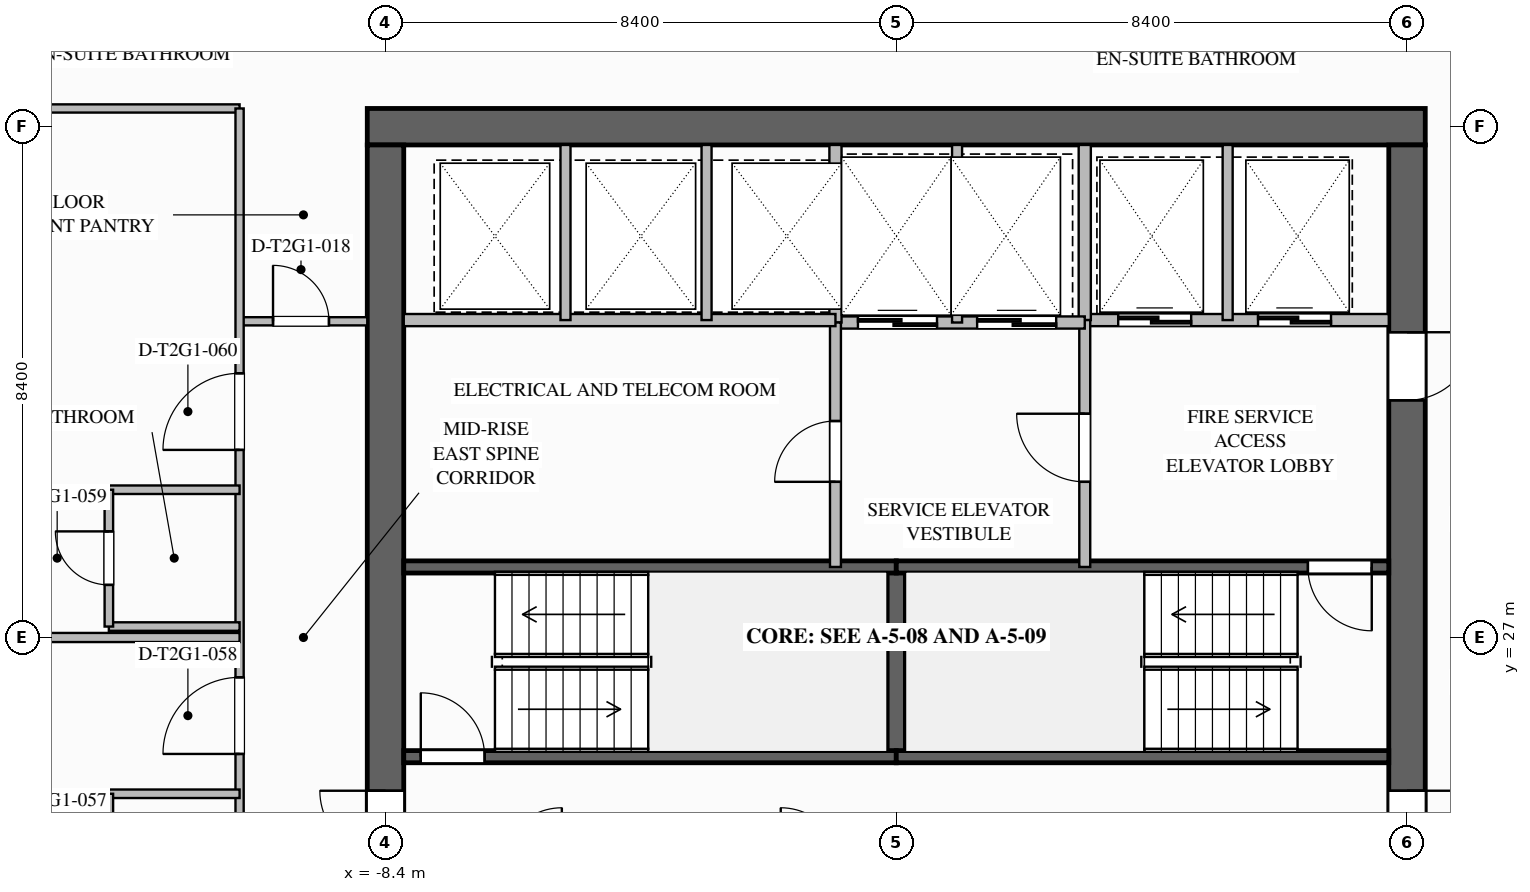
"""IFC4 building model, lengths in metres.
Left out: names, types, materials, properties, quantities, classifications, styles, units other than length and angle.
Written with IfcOpenShell. Run it as: python <this file> out.ifc"""

import sys

from ifc_helpers import new_model, si_unit, direction, frame, frame_2d, origin, place, context, subcontext, project, spatial, rectangle, extrude, element, fill, save


model = new_model("IFC4")
c1 = context("Model", 3, precision=1e-05, world=origin(), true_north=direction((0.0, 1.0)))
c2 = subcontext(c1, "Body", "Model", "MODEL_VIEW")
j1 = project(units=[si_unit("LENGTHUNIT", "METRE"), si_unit("PLANEANGLEUNIT", "RADIAN")], contexts=[c1])
p1 = place(None, origin())
s1 = spatial("IfcSite", under=j1, at=p1, CompositionType="ELEMENT")
p2 = place(p1, origin())
s2 = spatial("IfcBuilding", under=s1, at=p2, CompositionType="ELEMENT")
p3 = place(p2, frame((0.0, 0.0, 91.8)))
s3 = spatial("IfcBuildingStorey", under=s2, at=p3, CompositionType="ELEMENT", Elevation=91.8)
p4 = place(p3, frame((-8.7, 35.4, 0.0), z_axis=(0.0, 0.0, 1.0), x_axis=(1.0, 0.0, 0.0)))
e1 = element("IfcWall", 1, at=p4, inside=s3, PredefinedType="SHEAR", context=c2, shape_type="SweptSolid", body=[
    extrude(rectangle(XDim=17.4, YDim=0.6, at=frame_2d((8.7, 0.0))), origin(), (0.0, 0.0, 1.0), 3.5),
])
p5 = place(p3, frame((8.4, 35.1, 0.0), z_axis=(0.0, 0.0, 1.0), x_axis=(0.0, -1.0, 0.0)))
e2 = element("IfcWall", 2, at=p5, inside=s3, PredefinedType="SHEAR", context=c2, shape_type="SweptSolid", body=[
    extrude(rectangle(XDim=16.2, YDim=0.6, at=frame_2d((8.1, 0.0))), origin(), (0.0, 0.0, 1.0), 3.5),
])
p6 = place(p5, frame((3.08, 0.0, 0.0)))
e3 = element("IfcOpeningElement", 3, at=p6, cuts=e2, PredefinedType="OPENING", context=c2, shape_type="SweptSolid", body=[
    extrude(rectangle(XDim=1.12, YDim=2.1, at=frame_2d((0.56, 1.05))), frame((0.0, 0.31, 0.0), z_axis=(0.0, -1.0, 0.0), x_axis=(1.0, 0.0, 0.0)), (0.0, 0.0, 1.0), 0.62),
])
p7 = place(p5, frame((10.62, 0.0, 0.0)))
e4 = element("IfcOpeningElement", 4, at=p7, cuts=e2, PredefinedType="OPENING", context=c2, shape_type="SweptSolid", body=[
    extrude(rectangle(XDim=1.08, YDim=2.04, at=frame_2d((0.54, 1.02))), frame((0.0, 0.31, 0.0), z_axis=(0.0, -1.0, 0.0), x_axis=(1.0, 0.0, 0.0)), (0.0, 0.0, 1.0), 0.62),
])
p8 = place(p3, frame((-8.4, 18.9, 0.0), z_axis=(0.0, 0.0, 1.0), x_axis=(0.0, 1.0, 0.0)))
e5 = element("IfcWall", 5, at=p8, inside=s3, PredefinedType="SHEAR", context=c2, shape_type="SweptSolid", body=[
    extrude(rectangle(XDim=16.2, YDim=0.6, at=frame_2d((8.1, 0.0))), origin(), (0.0, 0.0, 1.0), 3.5),
])
p9 = place(p8, frame((4.5, 0.0, 0.0)))
e6 = element("IfcOpeningElement", 6, at=p9, cuts=e5, PredefinedType="OPENING", context=c2, shape_type="SweptSolid", body=[
    extrude(rectangle(XDim=1.08, YDim=2.04, at=frame_2d((0.54, 1.02))), frame((0.0, 0.31, 0.0), z_axis=(0.0, -1.0, 0.0), x_axis=(1.0, 0.0, 0.0)), (0.0, 0.0, 1.0), 0.62),
])
p10 = place(p3, frame((0.0, 25.04, 0.0), z_axis=(0.0, 0.0, 1.0), x_axis=(0.0, 1.0, 0.0)))
e7 = element("IfcWall", 7, at=p10, inside=s3, PredefinedType="SOLIDWALL", context=c2, shape_type="SweptSolid", body=[
    extrude(rectangle(XDim=3.12, YDim=0.3, at=frame_2d((1.56, 0.0))), origin(), (0.0, 0.0, 1.0), 3.24),
])
p11 = place(p3, frame((-8.1, 25.04, 0.0), z_axis=(0.0, 0.0, 1.0), x_axis=(1.0, 0.0, 0.0)))
e8 = element("IfcWall", 8, at=p11, inside=s3, PredefinedType="SOLIDWALL", context=c2, shape_type="SweptSolid", body=[
    extrude(rectangle(XDim=8.1, YDim=0.2, at=frame_2d((4.05, 0.0))), origin(), (0.0, 0.0, 1.0), 3.24),
])
p12 = place(p11, frame((0.28, 0.0, 0.0)))
e9 = element("IfcOpeningElement", 9, at=p12, cuts=e8, PredefinedType="OPENING", context=c2, shape_type="SweptSolid", body=[
    extrude(rectangle(XDim=1.05, YDim=2.1, at=frame_2d((0.525, 1.05))), frame((0.0, 0.11, 0.0), z_axis=(0.0, -1.0, 0.0), x_axis=(1.0, 0.0, 0.0)), (0.0, 0.0, 1.0), 0.22),
])
for number, where, z_axis, x_axis in (
    (10, (-8.1, 28.16, 0.0), (0.0, 0.0, 1.0), (1.0, 0.0, 0.0)),
    (11, (0.0, 25.04, 0.0), (0.0, 0.0, 1.0), (1.0, 0.0, 0.0)),
):
    element("IfcWall", number, at=place(p3, frame(where, z_axis=z_axis, x_axis=x_axis)), inside=s3, PredefinedType="SOLIDWALL", context=c2, shape_type="SweptSolid", body=[
        extrude(rectangle(XDim=8.1, YDim=0.2, at=frame_2d((4.05, 0.0))), origin(), (0.0, 0.0, 1.0), 3.24),
    ])
p13 = place(p3, frame((8.1, 28.16, 0.0), z_axis=(0.0, 0.0, 1.0), x_axis=(-1.0, 0.0, 0.0)))
e12 = element("IfcWall", 12, at=p13, inside=s3, PredefinedType="SOLIDWALL", context=c2, shape_type="SweptSolid", body=[
    extrude(rectangle(XDim=8.1, YDim=0.2, at=frame_2d((4.05, 0.0))), origin(), (0.0, 0.0, 1.0), 3.24),
])
p14 = place(p13, frame((0.28, 0.0, 0.0)))
e13 = element("IfcOpeningElement", 13, at=p14, cuts=e12, PredefinedType="OPENING", context=c2, shape_type="SweptSolid", body=[
    extrude(rectangle(XDim=1.05, YDim=2.1, at=frame_2d((0.525, 1.05))), frame((0.0, 0.11, 0.0), z_axis=(0.0, -1.0, 0.0), x_axis=(1.0, 0.0, 0.0)), (0.0, 0.0, 1.0), 0.22),
])
p15 = place(p3, frame((3.1, 32.22, 0.0), z_axis=(0.0, 0.0, 1.0), x_axis=(1.0, 0.0, 0.0)))
e14 = element("IfcWall", 14, at=p15, inside=s3, PredefinedType="SOLIDWALL", context=c2, shape_type="SweptSolid", body=[
    extrude(rectangle(XDim=5.0, YDim=0.2, at=frame_2d((2.5, 0.0))), origin(), (0.0, 0.0, 1.0), 3.24),
])
p16 = place(p15, frame((0.55, 0.0, 0.0)))
e15 = element("IfcOpeningElement", 15, at=p16, cuts=e14, PredefinedType="OPENING", context=c2, shape_type="SweptSolid", body=[
    extrude(rectangle(XDim=1.2, YDim=2.2, at=frame_2d((0.6, 1.1))), frame((0.0, 0.11, 0.0), z_axis=(0.0, -1.0, 0.0), x_axis=(1.0, 0.0, 0.0)), (0.0, 0.0, 1.0), 0.22),
])
p17 = place(p15, frame((2.85, 0.0, 0.0)))
e16 = element("IfcOpeningElement", 16, at=p17, cuts=e14, PredefinedType="OPENING", context=c2, shape_type="SweptSolid", body=[
    extrude(rectangle(XDim=1.2, YDim=2.2, at=frame_2d((0.6, 1.1))), frame((0.0, 0.11, 0.0), z_axis=(0.0, -1.0, 0.0), x_axis=(1.0, 0.0, 0.0)), (0.0, 0.0, 1.0), 0.22),
])
p18 = place(p3, frame((3.1, 32.22, 0.0), z_axis=(0.0, 0.0, 1.0), x_axis=(0.0, 1.0, 0.0)))
e17 = element("IfcWall", 17, at=p18, inside=s3, PredefinedType="SOLIDWALL", context=c2, shape_type="SweptSolid", body=[
    extrude(rectangle(XDim=2.88, YDim=0.2, at=frame_2d((1.44, 0.0))), origin(), (0.0, 0.0, 1.0), 3.24),
])
p19 = place(p3, frame((5.45, 32.22, 0.0), z_axis=(0.0, 0.0, 1.0), x_axis=(0.0, 1.0, 0.0)))
e18 = element("IfcWall", 18, at=p19, inside=s3, PredefinedType="PARTITIONING", context=c2, shape_type="SweptSolid", body=[
    extrude(rectangle(XDim=2.88, YDim=0.165, at=frame_2d((1.44, 0.0))), origin(), (0.0, 0.0, 1.0), 3.24),
])
p20 = place(p3, frame((3.1, 28.16, 0.0), z_axis=(0.0, 0.0, 1.0), x_axis=(0.0, 1.0, 0.0)))
e19 = element("IfcWall", 19, at=p20, inside=s3, PredefinedType="SOLIDWALL", context=c2, shape_type="SweptSolid", body=[
    extrude(rectangle(XDim=4.06, YDim=0.18, at=frame_2d((2.03, 0.0))), origin(), (0.0, 0.0, 1.0), 3.24),
])
p21 = place(p20, frame((1.4, 0.0, 0.0)))
e20 = element("IfcOpeningElement", 20, at=p21, cuts=e19, PredefinedType="OPENING", context=c2, shape_type="SweptSolid", body=[
    extrude(rectangle(XDim=1.12, YDim=2.1, at=frame_2d((0.56, 1.05))), frame((0.0, 0.1, 0.0), z_axis=(0.0, -1.0, 0.0), x_axis=(1.0, 0.0, 0.0)), (0.0, 0.0, 1.0), 0.2),
])
p22 = place(p3, frame((-1.0, 32.18, 0.0), z_axis=(0.0, 0.0, 1.0), x_axis=(1.0, 0.0, 0.0)))
e21 = element("IfcWall", 21, at=p22, inside=s3, PredefinedType="SOLIDWALL", context=c2, shape_type="SweptSolid", body=[
    extrude(rectangle(XDim=4.1, YDim=0.2, at=frame_2d((2.05, 0.0))), origin(), (0.0, 0.0, 1.0), 3.24),
])
p23 = place(p22, frame((0.37, 0.0, 0.0)))
e22 = element("IfcOpeningElement", 22, at=p23, cuts=e21, PredefinedType="OPENING", context=c2, shape_type="SweptSolid", body=[
    extrude(rectangle(XDim=1.3, YDim=2.2, at=frame_2d((0.65, 1.1))), frame((0.0, 0.11, 0.0), z_axis=(0.0, -1.0, 0.0), x_axis=(1.0, 0.0, 0.0)), (0.0, 0.0, 1.0), 0.22),
])
p24 = place(p22, frame((2.33, 0.0, 0.0)))
e23 = element("IfcOpeningElement", 23, at=p24, cuts=e21, PredefinedType="OPENING", context=c2, shape_type="SweptSolid", body=[
    extrude(rectangle(XDim=1.3, YDim=2.2, at=frame_2d((0.65, 1.1))), frame((0.0, 0.11, 0.0), z_axis=(0.0, -1.0, 0.0), x_axis=(1.0, 0.0, 0.0)), (0.0, 0.0, 1.0), 0.22),
])
p25 = place(p3, frame((-1.0, 32.18, 0.0), z_axis=(0.0, 0.0, 1.0), x_axis=(0.0, 1.0, 0.0)))
e24 = element("IfcWall", 24, at=p25, inside=s3, PredefinedType="SOLIDWALL", context=c2, shape_type="SweptSolid", body=[
    extrude(rectangle(XDim=2.92, YDim=0.2, at=frame_2d((1.46, 0.0))), origin(), (0.0, 0.0, 1.0), 3.24),
])
p26 = place(p3, frame((1.0, 32.18, 0.0), z_axis=(0.0, 0.0, 1.0), x_axis=(0.0, 1.0, 0.0)))
e25 = element("IfcWall", 25, at=p26, inside=s3, PredefinedType="PARTITIONING", context=c2, shape_type="SweptSolid", body=[
    extrude(rectangle(XDim=2.92, YDim=0.165, at=frame_2d((1.46, 0.0))), origin(), (0.0, 0.0, 1.0), 3.24),
])
p27 = place(p3, frame((-1.0, 28.16, 0.0), z_axis=(0.0, 0.0, 1.0), x_axis=(0.0, 1.0, 0.0)))
e26 = element("IfcWall", 26, at=p27, inside=s3, PredefinedType="SOLIDWALL", context=c2, shape_type="SweptSolid", body=[
    extrude(rectangle(XDim=4.02, YDim=0.18, at=frame_2d((2.01, 0.0))), origin(), (0.0, 0.0, 1.0), 3.24),
])
p28 = place(p27, frame((1.4, 0.0, 0.0)))
e27 = element("IfcOpeningElement", 27, at=p28, cuts=e26, PredefinedType="OPENING", context=c2, shape_type="SweptSolid", body=[
    extrude(rectangle(XDim=1.0, YDim=2.1, at=frame_2d((0.5, 1.05))), frame((0.0, 0.1, 0.0), z_axis=(0.0, -1.0, 0.0), x_axis=(1.0, 0.0, 0.0)), (0.0, 0.0, 1.0), 0.2),
])
p29 = place(p3, frame((-8.1, 32.22, 0.0), z_axis=(0.0, 0.0, 1.0), x_axis=(1.0, 0.0, 0.0)))
e28 = element("IfcWall", 28, at=p29, inside=s3, PredefinedType="SOLIDWALL", context=c2, shape_type="SweptSolid", body=[
    extrude(rectangle(XDim=7.1, YDim=0.2, at=frame_2d((3.55, 0.0))), origin(), (0.0, 0.0, 1.0), 3.24),
])
for number, where, z_axis, x_axis in (
    (29, (-5.44, 32.22, 0.0), (0.0, 0.0, 1.0), (0.0, 1.0, 0.0)),
    (30, (-3.12, 32.22, 0.0), (0.0, 0.0, 1.0), (0.0, 1.0, 0.0)),
):
    element("IfcWall", number, at=place(p3, frame(where, z_axis=z_axis, x_axis=x_axis)), inside=s3, PredefinedType="PARTITIONING", context=c2, shape_type="SweptSolid", body=[
        extrude(rectangle(XDim=2.88, YDim=0.165, at=frame_2d((1.44, 0.0))), origin(), (0.0, 0.0, 1.0), 3.24),
    ])
p30 = place(p3, frame((-10.8, 32.2, 0.0), z_axis=(0.0, 0.0, 1.0), x_axis=(1.0, 0.0, 0.0)))
e31 = element("IfcWall", 31, at=p30, inside=s3, PredefinedType="PARTITIONING", context=c2, shape_type="SweptSolid", body=[
    extrude(rectangle(XDim=2.1, YDim=0.135, at=frame_2d((1.05, 0.0))), origin(), (0.0, 0.0, 1.0), 3.24),
])
p31 = place(p30, frame((0.55, 0.0, 0.0)))
e32 = element("IfcOpeningElement", 32, at=p31, cuts=e31, PredefinedType="OPENING", context=c2, shape_type="SweptSolid", body=[
    extrude(rectangle(XDim=0.92, YDim=2.1, at=frame_2d((0.46, 1.05))), frame((0.0, 0.077, 0.0), z_axis=(0.0, -1.0, 0.0), x_axis=(1.0, 0.0, 0.0)), (0.0, 0.0, 1.0), 0.155),
])
p32 = place(p3, frame((-16.2, 35.7, 0.0), z_axis=(0.0, 0.0, 1.0), x_axis=(1.0, 0.0, 0.0)))
e33 = element("IfcWall", 33, at=p32, inside=s3, PredefinedType="PARTITIONING", context=c2, shape_type="SweptSolid", body=[
    extrude(rectangle(XDim=5.4, YDim=0.135, at=frame_2d((2.7, 0.0))), origin(), (0.0, 0.0, 1.0), 3.24),
])
p33 = place(p3, frame((-10.8, 18.3, 0.0), z_axis=(0.0, 0.0, 1.0), x_axis=(0.0, 1.0, 0.0)))
e34 = element("IfcWall", 34, at=p33, inside=s3, PredefinedType="PARTITIONING", context=c2, shape_type="SweptSolid", body=[
    extrude(rectangle(XDim=17.4, YDim=0.135, at=frame_2d((8.7, 0.0))), origin(), (0.0, 0.0, 1.0), 3.24),
])
p34 = place(p33, frame((6.785, 0.0, 0.0)))
e35 = element("IfcOpeningElement", 35, at=p34, cuts=e34, PredefinedType="OPENING", context=c2, shape_type="SweptSolid", body=[
    extrude(rectangle(XDim=1.26, YDim=2.2, at=frame_2d((0.63, 1.1))), frame((0.0, 0.077, 0.0), z_axis=(0.0, -1.0, 0.0), x_axis=(1.0, 0.0, 0.0)), (0.0, 0.0, 1.0), 0.155),
])
p35 = place(p33, frame((11.785, 0.0, 0.0)))
e36 = element("IfcOpeningElement", 36, at=p35, cuts=e34, PredefinedType="OPENING", context=c2, shape_type="SweptSolid", body=[
    extrude(rectangle(XDim=1.26, YDim=2.2, at=frame_2d((0.63, 1.1))), frame((0.0, 0.077, 0.0), z_axis=(0.0, -1.0, 0.0), x_axis=(1.0, 0.0, 0.0)), (0.0, 0.0, 1.0), 0.155),
])
p36 = place(p3, frame((-26.2, 27.0, 0.0), z_axis=(0.0, 0.0, 1.0), x_axis=(1.0, 0.0, 0.0)))
e37 = element("IfcWall", 37, at=p36, inside=s3, PredefinedType="PARTITIONING", context=c2, shape_type="SweptSolid", body=[
    extrude(rectangle(XDim=15.4, YDim=0.15, at=frame_2d((7.7, 0.0))), origin(), (0.0, 0.0, 1.0), 2.452),
])
p37 = place(p3, frame((-10.8, 24.43, 0.0), z_axis=(0.0, 0.0, 1.0), x_axis=(-1.0, 0.0, 0.0)))
e38 = element("IfcWall", 38, at=p37, inside=s3, PredefinedType="PLUMBINGWALL", context=c2, shape_type="SweptSolid", body=[
    extrude(rectangle(XDim=2.15, YDim=0.14, at=frame_2d((1.075, 0.0))), origin(), (0.0, 0.0, 1.0), 3.24),
])
p38 = place(p3, frame((-12.95, 22.18, 0.0), z_axis=(0.0, 0.0, 1.0), x_axis=(0.0, 1.0, 0.0)))
e39 = element("IfcWall", 39, at=p38, inside=s3, PredefinedType="PLUMBINGWALL", context=c2, shape_type="SweptSolid", body=[
    extrude(rectangle(XDim=2.25, YDim=0.14, at=frame_2d((1.125, 0.0))), origin(), (0.0, 0.0, 1.0), 3.24),
])
p39 = place(p38, frame((0.685, 0.0, 0.0)))
e40 = element("IfcOpeningElement", 40, at=p39, cuts=e39, PredefinedType="OPENING", context=c2, shape_type="SweptSolid", body=[
    extrude(rectangle(XDim=0.88, YDim=2.1, at=frame_2d((0.44, 1.05))), frame((0.0, 0.08, 0.0), z_axis=(0.0, -1.0, 0.0), x_axis=(1.0, 0.0, 0.0)), (0.0, 0.0, 1.0), 0.16),
])
p40 = place(p3, frame((-10.8, 27.18, 0.0), z_axis=(0.0, 0.0, 1.0), x_axis=(-1.0, 0.0, 0.0)))
e41 = element("IfcWall", 41, at=p40, inside=s3, PredefinedType="PLUMBINGWALL", context=c2, shape_type="SweptSolid", body=[
    extrude(rectangle(XDim=2.15, YDim=0.14, at=frame_2d((1.075, 0.0))), origin(), (0.0, 0.0, 1.0), 2.617),
])
p41 = place(p3, frame((-10.8, 29.43, 0.0), z_axis=(0.0, 0.0, 1.0), x_axis=(-1.0, 0.0, 0.0)))
e42 = element("IfcWall", 42, at=p41, inside=s3, PredefinedType="PLUMBINGWALL", context=c2, shape_type="SweptSolid", body=[
    extrude(rectangle(XDim=2.15, YDim=0.14, at=frame_2d((1.075, 0.0))), origin(), (0.0, 0.0, 1.0), 3.24),
])
p42 = place(p3, frame((-12.95, 27.18, 0.0), z_axis=(0.0, 0.0, 1.0), x_axis=(0.0, 1.0, 0.0)))
e43 = element("IfcWall", 43, at=p42, inside=s3, PredefinedType="PLUMBINGWALL", context=c2, shape_type="SweptSolid", body=[
    extrude(rectangle(XDim=2.25, YDim=0.14, at=frame_2d((1.125, 0.0))), origin(), (0.0, 0.0, 1.0), 3.24),
])
p43 = place(p42, frame((0.685, 0.0, 0.0)))
e44 = element("IfcOpeningElement", 44, at=p43, cuts=e43, PredefinedType="OPENING", context=c2, shape_type="SweptSolid", body=[
    extrude(rectangle(XDim=0.88, YDim=2.1, at=frame_2d((0.44, 1.05))), frame((0.0, 0.08, 0.0), z_axis=(0.0, -1.0, 0.0), x_axis=(1.0, 0.0, 0.0)), (0.0, 0.0, 1.0), 0.16),
])
p44 = place(p12, origin())
e45 = element("IfcDoor", 45, at=p44, inside=s3, OperationType="SINGLE_SWING_LEFT", PredefinedType="DOOR", context=c2, shape_type="SweptSolid", body=[
    extrude(rectangle(XDim=1.05, YDim=2.1, at=frame_2d((0.525, 1.05))), frame((0.0, 0.025, 0.0), z_axis=(0.0, -1.0, 0.0), x_axis=(1.0, 0.0, 0.0)), (0.0, 0.0, 1.0), 0.05),
])
fill(e9, e45)
p45 = place(p14, origin())
e46 = element("IfcDoor", 46, at=p45, inside=s3, OperationType="SINGLE_SWING_LEFT", PredefinedType="DOOR", context=c2, shape_type="SweptSolid", body=[
    extrude(rectangle(XDim=1.05, YDim=2.1, at=frame_2d((0.525, 1.05))), frame((0.0, 0.025, 0.0), z_axis=(0.0, -1.0, 0.0), x_axis=(1.0, 0.0, 0.0)), (0.0, 0.0, 1.0), 0.05),
])
fill(e13, e46)
p46 = place(p16, origin())
e47 = element("IfcDoor", 47, at=p46, inside=s3, OperationType="SLIDING_TO_LEFT", PredefinedType="DOOR", context=c2, shape_type="SweptSolid", body=[
    extrude(rectangle(XDim=1.2, YDim=2.2, at=frame_2d((0.6, 1.1))), frame((0.0, 0.025, 0.0), z_axis=(0.0, -1.0, 0.0), x_axis=(1.0, 0.0, 0.0)), (0.0, 0.0, 1.0), 0.05),
])
fill(e15, e47)
p47 = place(p17, origin())
e48 = element("IfcDoor", 48, at=p47, inside=s3, OperationType="SLIDING_TO_LEFT", PredefinedType="DOOR", context=c2, shape_type="SweptSolid", body=[
    extrude(rectangle(XDim=1.2, YDim=2.2, at=frame_2d((0.6, 1.1))), frame((0.0, 0.025, 0.0), z_axis=(0.0, -1.0, 0.0), x_axis=(1.0, 0.0, 0.0)), (0.0, 0.0, 1.0), 0.05),
])
fill(e16, e48)
p48 = place(p21, origin())
e49 = element("IfcDoor", 49, at=p48, inside=s3, OperationType="SINGLE_SWING_RIGHT", PredefinedType="DOOR", context=c2, shape_type="SweptSolid", body=[
    extrude(rectangle(XDim=1.12, YDim=2.1, at=frame_2d((0.56, 1.05))), frame((0.0, 0.025, 0.0), z_axis=(0.0, -1.0, 0.0), x_axis=(1.0, 0.0, 0.0)), (0.0, 0.0, 1.0), 0.05),
])
fill(e20, e49)
p49 = place(p6, origin())
e50 = element("IfcDoor", 50, at=p49, inside=s3, OperationType="SINGLE_SWING_LEFT", PredefinedType="DOOR", context=c2, shape_type="SweptSolid", body=[
    extrude(rectangle(XDim=1.12, YDim=2.1, at=frame_2d((0.56, 1.05))), frame((0.0, 0.025, 0.0), z_axis=(0.0, -1.0, 0.0), x_axis=(1.0, 0.0, 0.0)), (0.0, 0.0, 1.0), 0.05),
])
fill(e3, e50)
p50 = place(p23, origin())
e51 = element("IfcDoor", 51, at=p50, inside=s3, OperationType="SLIDING_TO_LEFT", PredefinedType="DOOR", context=c2, shape_type="SweptSolid", body=[
    extrude(rectangle(XDim=1.3, YDim=2.2, at=frame_2d((0.65, 1.1))), frame((0.0, 0.025, 0.0), z_axis=(0.0, -1.0, 0.0), x_axis=(1.0, 0.0, 0.0)), (0.0, 0.0, 1.0), 0.05),
])
fill(e22, e51)
p51 = place(p24, origin())
e52 = element("IfcDoor", 52, at=p51, inside=s3, OperationType="SLIDING_TO_LEFT", PredefinedType="DOOR", context=c2, shape_type="SweptSolid", body=[
    extrude(rectangle(XDim=1.3, YDim=2.2, at=frame_2d((0.65, 1.1))), frame((0.0, 0.025, 0.0), z_axis=(0.0, -1.0, 0.0), x_axis=(1.0, 0.0, 0.0)), (0.0, 0.0, 1.0), 0.05),
])
fill(e23, e52)
p52 = place(p28, origin())
e53 = element("IfcDoor", 53, at=p52, inside=s3, OperationType="SINGLE_SWING_LEFT", PredefinedType="DOOR", context=c2, shape_type="SweptSolid", body=[
    extrude(rectangle(XDim=1.0, YDim=2.1, at=frame_2d((0.5, 1.05))), frame((0.0, 0.025, 0.0), z_axis=(0.0, -1.0, 0.0), x_axis=(1.0, 0.0, 0.0)), (0.0, 0.0, 1.0), 0.05),
])
fill(e27, e53)
p53 = place(p9, origin())
e54 = element("IfcDoor", 54, at=p53, inside=s3, OperationType="SINGLE_SWING_RIGHT", PredefinedType="DOOR", context=c2, shape_type="SweptSolid", body=[
    extrude(rectangle(XDim=1.08, YDim=2.04, at=frame_2d((0.54, 1.02))), frame((0.0, 0.025, 0.0), z_axis=(0.0, -1.0, 0.0), x_axis=(1.0, 0.0, 0.0)), (0.0, 0.0, 1.0), 0.05),
])
fill(e6, e54)
p54 = place(p7, origin())
e55 = element("IfcDoor", 55, at=p54, inside=s3, OperationType="SINGLE_SWING_LEFT", PredefinedType="DOOR", context=c2, shape_type="SweptSolid", body=[
    extrude(rectangle(XDim=1.08, YDim=2.04, at=frame_2d((0.54, 1.02))), frame((0.0, 0.025, 0.0), z_axis=(0.0, -1.0, 0.0), x_axis=(1.0, 0.0, 0.0)), (0.0, 0.0, 1.0), 0.05),
])
fill(e4, e55)
p55 = place(p31, origin())
e56 = element("IfcDoor", 56, at=p55, inside=s3, OperationType="SINGLE_SWING_LEFT", PredefinedType="DOOR", context=c2, shape_type="SweptSolid", body=[
    extrude(rectangle(XDim=0.92, YDim=2.1, at=frame_2d((0.46, 1.05))), frame((0.0, 0.025, 0.0), z_axis=(0.0, -1.0, 0.0), x_axis=(1.0, 0.0, 0.0)), (0.0, 0.0, 1.0), 0.05),
])
fill(e32, e56)
p56 = place(p34, origin())
e57 = element("IfcDoor", 57, at=p56, inside=s3, OperationType="SINGLE_SWING_LEFT", PredefinedType="DOOR", context=c2, shape_type="SweptSolid", body=[
    extrude(rectangle(XDim=1.26, YDim=2.2, at=frame_2d((0.63, 1.1))), frame((0.0, 0.025, 0.0), z_axis=(0.0, -1.0, 0.0), x_axis=(1.0, 0.0, 0.0)), (0.0, 0.0, 1.0), 0.05),
])
fill(e35, e57)
p57 = place(p43, origin())
e58 = element("IfcDoor", 58, at=p57, inside=s3, OperationType="SINGLE_SWING_RIGHT", PredefinedType="DOOR", context=c2, shape_type="SweptSolid", body=[
    extrude(rectangle(XDim=0.88, YDim=2.1, at=frame_2d((0.44, 1.05))), frame((0.0, 0.025, 0.0), z_axis=(0.0, -1.0, 0.0), x_axis=(1.0, 0.0, 0.0)), (0.0, 0.0, 1.0), 0.05),
])
fill(e44, e58)
p58 = place(p35, origin())
e59 = element("IfcDoor", 59, at=p58, inside=s3, OperationType="SINGLE_SWING_LEFT", PredefinedType="DOOR", context=c2, shape_type="SweptSolid", body=[
    extrude(rectangle(XDim=1.26, YDim=2.2, at=frame_2d((0.63, 1.1))), frame((0.0, 0.025, 0.0), z_axis=(0.0, -1.0, 0.0), x_axis=(1.0, 0.0, 0.0)), (0.0, 0.0, 1.0), 0.05),
])
fill(e36, e59)
save(model, sys.argv[1])
